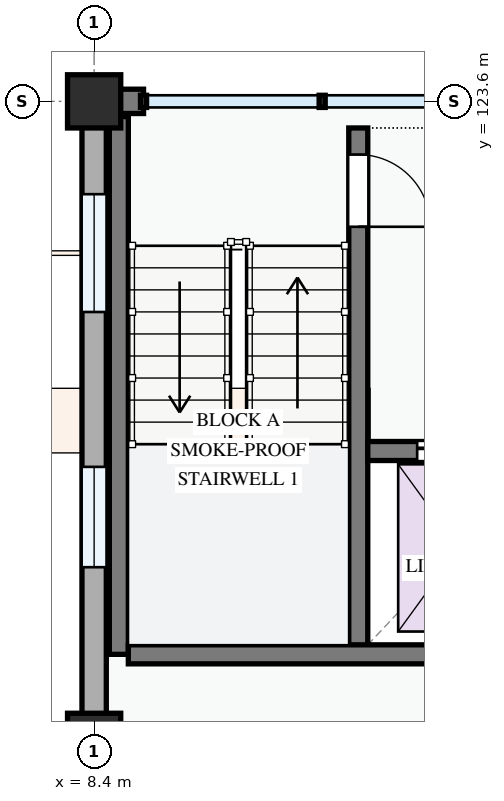
"""IFC4 building model, lengths in metres.
Left out: names, types, materials, properties, quantities, classifications, styles, units other than length and angle.
Written with IfcOpenShell. Run it as: python <this file> out.ifc"""

import sys

from ifc_helpers import new_model, si_unit, direction, frame, frame_2d, origin, origin_2d, place, context, subcontext, project, spatial, rectangle, extrude, element, fill, save


model = new_model("IFC4")
c1 = context("Model", 3, precision=1e-05, world=origin(), true_north=direction((0.0, 1.0)))
c2 = subcontext(c1, "Body", "Model", "MODEL_VIEW")
j1 = project(units=[si_unit("LENGTHUNIT", "METRE"), si_unit("PLANEANGLEUNIT", "RADIAN")], contexts=[c1])
p1 = place(None, origin())
s1 = spatial("IfcSite", under=j1, at=p1, CompositionType="ELEMENT")
p2 = place(p1, origin())
s2 = spatial("IfcBuilding", under=s1, at=p2, CompositionType="ELEMENT")
p3 = place(p2, frame((0.0, 0.0, 21.3)))
s3 = spatial("IfcBuildingStorey", under=s2, at=p3, CompositionType="ELEMENT", Elevation=21.3)
for number, where, z_axis, x_axis in (
    (1, (8.4, 115.2, 0.0), (0.0, 0.0, 1.0), (1.0, 0.0, 0.0)),
    (2, (8.4, 123.6, 0.0), (0.0, 0.0, 1.0), (1.0, 0.0, 0.0)),
):
    element("IfcColumn", number, at=place(p3, frame(where, z_axis=z_axis, x_axis=x_axis)), inside=s3, PredefinedType="COLUMN", context=c2, shape_type="SweptSolid", body=[
        extrude(rectangle(XDim=0.7, YDim=0.7, at=origin_2d()), origin(), (0.0, 0.0, 1.0), 3.3),
    ])
p4 = place(p3, frame((9.05, 123.6, 0.0), z_axis=(0.0, 0.0, 1.0), x_axis=(-1.0, 0.0, 0.0)))
e3 = element("IfcWall", 3, at=p4, inside=s3, PredefinedType="STANDARD", context=c2, shape_type="SweptSolid", body=[
    extrude(rectangle(XDim=0.488, YDim=0.32, at=frame_2d((0.244, 0.0))), origin(), (0.0, 0.0, 1.0), 3.04),
])
p5 = place(p3, frame((8.4, 123.6, 0.0), z_axis=(0.0, 0.0, 1.0), x_axis=(0.0, -1.0, 0.0)))
e4 = element("IfcWall", 4, at=p5, inside=s3, PredefinedType="STANDARD", context=c2, shape_type="SweptSolid", body=[
    extrude(rectangle(XDim=8.4, YDim=0.32, at=frame_2d((4.2, 0.0))), origin(), (0.0, 0.0, 1.0), 2.345),
])
p6 = place(p5, frame((1.221, 0.0, 0.78)))
e5 = element("IfcOpeningElement", 5, at=p6, cuts=e4, PredefinedType="OPENING", context=c2, shape_type="SweptSolid", body=[
    extrude(rectangle(XDim=1.55, YDim=1.4, at=frame_2d((0.775, 0.7))), frame((0.0, 0.17, 0.0), z_axis=(0.0, -1.0, 0.0), x_axis=(1.0, 0.0, 0.0)), (0.0, 0.0, 1.0), 0.34),
])
p7 = place(p5, frame((4.809, 0.0, 0.78)))
e6 = element("IfcOpeningElement", 6, at=p7, cuts=e4, PredefinedType="OPENING", context=c2, shape_type="SweptSolid", body=[
    extrude(rectangle(XDim=1.32, YDim=1.35, at=frame_2d((0.66, 0.675))), frame((0.0, 0.17, 0.0), z_axis=(0.0, -1.0, 0.0), x_axis=(1.0, 0.0, 0.0)), (0.0, 0.0, 1.0), 0.34),
])
p8 = place(p3, frame((11.875, 123.25, 0.0), z_axis=(0.0, 0.0, 1.0), x_axis=(0.0, -1.0, 0.0)))
e7 = element("IfcWall", 7, at=p8, inside=s3, PredefinedType="SHEAR", context=c2, shape_type="SweptSolid", body=[
    extrude(rectangle(XDim=6.925, YDim=0.25, at=frame_2d((3.462, 0.0))), origin(), (0.0, 0.0, 1.0), 3.0),
])
p9 = place(p8, frame((0.35, 0.0, 0.0)))
e8 = element("IfcOpeningElement", 8, at=p9, cuts=e7, PredefinedType="OPENING", context=c2, shape_type="SweptSolid", body=[
    extrude(rectangle(XDim=0.95, YDim=2.1, at=frame_2d((0.475, 1.05))), frame((0.0, 0.135, 0.0), z_axis=(0.0, -1.0, 0.0), x_axis=(1.0, 0.0, 0.0)), (0.0, 0.0, 1.0), 0.27),
])
p10 = place(p3, frame((8.725, 123.4, 0.0), z_axis=(0.0, 0.0, 1.0), x_axis=(0.0, -1.0, 0.0)))
e9 = element("IfcWall", 9, at=p10, inside=s3, PredefinedType="SHEAR", context=c2, shape_type="SweptSolid", body=[
    extrude(rectangle(XDim=7.075, YDim=0.25, at=frame_2d((3.538, 0.0))), origin(), (0.0, 0.0, 1.0), 3.0),
])
p11 = place(p3, frame((12.0, 119.0, 0.0), z_axis=(0.0, 0.0, 1.0), x_axis=(1.0, 0.0, 0.0)))
e10 = element("IfcWall", 10, at=p11, inside=s3, PredefinedType="SHEAR", context=c2, shape_type="SweptSolid", body=[
    extrude(rectangle(XDim=2.425, YDim=0.25, at=frame_2d((1.212, 0.0))), origin(), (0.0, 0.0, 1.0), 3.0),
])
p12 = place(p11, frame((0.65, 0.0, 0.0)))
e11 = element("IfcOpeningElement", 11, at=p12, cuts=e10, PredefinedType="OPENING", context=c2, shape_type="SweptSolid", body=[
    extrude(rectangle(XDim=1.1, YDim=2.15, at=frame_2d((0.55, 1.075))), frame((0.0, 0.135, 0.0), z_axis=(0.0, -1.0, 0.0), x_axis=(1.0, 0.0, 0.0)), (0.0, 0.0, 1.0), 0.27),
])
p13 = place(p3, frame((8.85, 116.325, 0.0), z_axis=(0.0, 0.0, 1.0), x_axis=(1.0, 0.0, 0.0)))
e12 = element("IfcWall", 12, at=p13, inside=s3, PredefinedType="SHEAR", context=c2, shape_type="SweptSolid", body=[
    extrude(rectangle(XDim=13.5, YDim=0.25, at=frame_2d((6.75, 0.0))), origin(), (0.0, 0.0, 1.0), 3.0),
])
p14 = place(p13, frame((6.2, 0.0, 0.0)))
e13 = element("IfcOpeningElement", 13, at=p14, cuts=e12, PredefinedType="OPENING", context=c2, shape_type="SweptSolid", body=[
    extrude(rectangle(XDim=1.1, YDim=2.15, at=frame_2d((0.55, 1.075))), frame((0.0, 0.135, 0.0), z_axis=(0.0, -1.0, 0.0), x_axis=(1.0, 0.0, 0.0)), (0.0, 0.0, 1.0), 0.27),
])
p15 = place(p6, origin())
e14 = element("IfcWindow", 14, at=p15, inside=s3, PartitioningType="SINGLE_PANEL", PredefinedType="WINDOW", context=c2, shape_type="SweptSolid", body=[
    extrude(rectangle(XDim=1.55, YDim=1.4, at=frame_2d((0.775, 0.7))), frame((0.0, 0.03, 0.0), z_axis=(0.0, -1.0, 0.0), x_axis=(1.0, 0.0, 0.0)), (0.0, 0.0, 1.0), 0.06),
])
fill(e5, e14)
p16 = place(p7, origin())
e15 = element("IfcWindow", 15, at=p16, inside=s3, PartitioningType="SINGLE_PANEL", PredefinedType="WINDOW", context=c2, shape_type="SweptSolid", body=[
    extrude(rectangle(XDim=1.32, YDim=1.35, at=frame_2d((0.66, 0.675))), frame((0.0, 0.03, 0.0), z_axis=(0.0, -1.0, 0.0), x_axis=(1.0, 0.0, 0.0)), (0.0, 0.0, 1.0), 0.06),
])
fill(e6, e15)
p17 = place(p9, origin())
e16 = element("IfcDoor", 16, at=p17, inside=s3, OperationType="SINGLE_SWING_RIGHT", PredefinedType="DOOR", context=c2, shape_type="SweptSolid", body=[
    extrude(rectangle(XDim=0.95, YDim=2.1, at=frame_2d((0.475, 1.05))), frame((0.0, 0.025, 0.0), z_axis=(0.0, -1.0, 0.0), x_axis=(1.0, 0.0, 0.0)), (0.0, 0.0, 1.0), 0.05),
])
fill(e8, e16)
p18 = place(p12, origin())
e17 = element("IfcDoor", 17, at=p18, inside=s3, OperationType="SLIDING_TO_LEFT", PredefinedType="DOOR", context=c2, shape_type="SweptSolid", body=[
    extrude(rectangle(XDim=1.1, YDim=2.15, at=frame_2d((0.55, 1.075))), frame((0.0, 0.025, 0.0), z_axis=(0.0, -1.0, 0.0), x_axis=(1.0, 0.0, 0.0)), (0.0, 0.0, 1.0), 0.05),
])
fill(e11, e17)
save(model, sys.argv[1])
